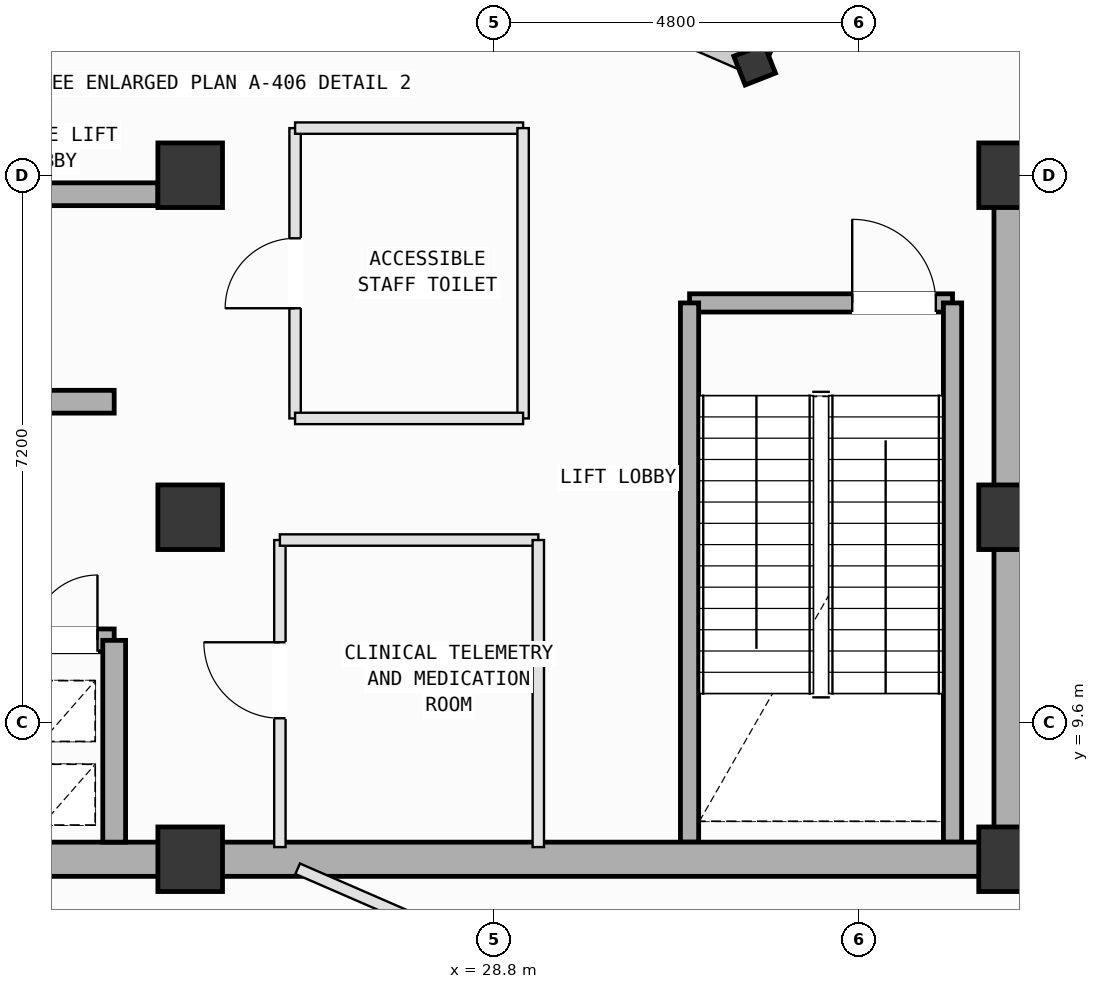
"""IFC4 building model, lengths in metres.
Left out: names, types, materials, properties, quantities, classifications, styles, units other than length and angle.
Written with IfcOpenShell. Run it as: python <this file> out.ifc"""

import sys

from ifc_helpers import new_model, si_unit, direction, frame, frame_2d, origin, origin_2d, place, context, subcontext, project, spatial, rectangle, i_section, extrude, element, fill, save


model = new_model("IFC4")
c1 = context("Model", 3, precision=1e-05, world=origin(), true_north=direction((0.0, 1.0)))
c2 = subcontext(c1, "Body", "Model", "MODEL_VIEW")
j1 = project(units=[si_unit("LENGTHUNIT", "METRE"), si_unit("PLANEANGLEUNIT", "RADIAN")], contexts=[c1])
p1 = place(None, origin())
s1 = spatial("IfcSite", under=j1, at=p1, CompositionType="ELEMENT")
p2 = place(p1, origin())
s2 = spatial("IfcBuilding", under=s1, at=p2, CompositionType="ELEMENT")
p3 = place(p2, frame((0.0, 0.0, 342.6)))
s3 = spatial("IfcBuildingStorey", under=s2, at=p3, CompositionType="ELEMENT", Elevation=342.6)
for number, where, z_axis, x_axis in (
    (1, (24.8, 7.8, 0.0), (0.0, 0.0, 1.0), (1.0, 0.0, 0.0)),
    (2, (24.8, 12.3, 0.0), (0.0, 0.0, 1.0), (1.0, 0.0, 0.0)),
    (3, (24.8, 16.8, 0.0), (0.0, 0.0, 1.0), (1.0, 0.0, 0.0)),
    (4, (35.6, 7.8, 0.0), (0.0, 0.0, 1.0), (1.0, 0.0, 0.0)),
    (5, (35.6, 12.3, 0.0), (0.0, 0.0, 1.0), (1.0, 0.0, 0.0)),
    (6, (35.6, 16.8, 0.0), (0.0, 0.0, 1.0), (1.0, 0.0, 0.0)),
):
    element("IfcColumn", number, at=place(p3, frame(where, z_axis=z_axis, x_axis=x_axis)), inside=s3, PredefinedType="COLUMN", context=c2, shape_type="SweptSolid", body=[
        extrude(rectangle(XDim=0.85, YDim=0.85, at=origin_2d()), origin(), (0.0, 0.0, 1.0), 5.2),
    ])
p4 = place(p3, frame((32.226, 18.255, 0.002), z_axis=(0.0, 0.0, 1.0), x_axis=(-0.366501226724, 0.930417567982, 0.0)))
e7 = element("IfcColumn", 7, at=p4, inside=s3, PredefinedType="COLUMN", context=c2, shape_type="SweptSolid", body=[
    extrude(i_section(OverallWidth=0.407, OverallDepth=0.428, WebThickness=0.02, FlangeThickness=0.035, FilletRadius=0.022, at=origin_2d()), origin(), (0.0, 0.0, 1.0), 5.196),
])
p5 = place(p3, frame((32.226, 18.255, 0.0), z_axis=(0.0, 0.0, 1.0), x_axis=(0.398742809918, 0.917062795853, 0.0)))
e8 = element("IfcWall", 8, at=p5, inside=s3, PredefinedType="SOLIDWALL", context=c2, shape_type="SweptSolid", body=[
    extrude(rectangle(XDim=6.95, YDim=0.28, at=frame_2d((3.475, 0.0))), origin(), (0.0, 0.0, 1.0), 4.335),
])
p6 = place(p5, frame((1.066, 0.0, 0.75)))
e9 = element("IfcOpeningElement", 9, at=p6, cuts=e8, PredefinedType="OPENING", context=c2, shape_type="SweptSolid", body=[
    extrude(rectangle(XDim=1.4, YDim=1.85, at=frame_2d((0.7, 0.925))), frame((0.0, 0.15, 0.0), z_axis=(0.0, -1.0, 0.0), x_axis=(1.0, 0.0, 0.0)), (0.0, 0.0, 1.0), 0.3),
])
p7 = place(p3, frame((25.119, 21.345, 0.0), z_axis=(0.0, 0.0, 1.0), x_axis=(0.917063044715, -0.398742237565, 0.0)))
e10 = element("IfcWall", 10, at=p7, inside=s3, PredefinedType="SOLIDWALL", context=c2, shape_type="SweptSolid", body=[
    extrude(rectangle(XDim=7.75, YDim=0.28, at=frame_2d((3.875, 0.0))), origin(), (0.0, 0.0, 1.0), 3.835),
])
p8 = place(p3, frame((31.37, 15.12, 0.0), z_axis=(0.0, 0.0, 1.0), x_axis=(1.0, 0.0, 0.0)))
e11 = element("IfcWall", 11, at=p8, inside=s3, PredefinedType="SOLIDWALL", context=c2, shape_type="SweptSolid", body=[
    extrude(rectangle(XDim=3.46, YDim=0.24, at=frame_2d((1.73, 0.0))), origin(), (0.0, 0.0, 1.0), 4.85),
])
p9 = place(p8, frame((2.14, 0.0, 0.0)))
e12 = element("IfcOpeningElement", 12, at=p9, cuts=e11, PredefinedType="OPENING", context=c2, shape_type="SweptSolid", body=[
    extrude(rectangle(XDim=1.1, YDim=2.15, at=frame_2d((0.55, 1.075))), frame((0.0, 0.13, 0.0), z_axis=(0.0, -1.0, 0.0), x_axis=(1.0, 0.0, 0.0)), (0.0, 0.0, 1.0), 0.26),
])
for number, where, z_axis, x_axis in (
    (13, (34.83, 15.12, 0.0), (0.0, 0.0, 1.0), (0.0, -1.0, 0.0)),
    (14, (31.37, 8.025, 0.0), (0.0, 0.0, 1.0), (0.0, 1.0, 0.0)),
):
    element("IfcWall", number, at=place(p3, frame(where, z_axis=z_axis, x_axis=x_axis)), inside=s3, PredefinedType="SOLIDWALL", context=c2, shape_type="SweptSolid", body=[
        extrude(rectangle(XDim=7.095, YDim=0.24, at=frame_2d((3.548, 0.0))), origin(), (0.0, 0.0, 1.0), 4.85),
    ])
for number, where, z_axis, x_axis in (
    (15, (14.0, 7.8, 0.0), (0.0, 0.0, 1.0), (1.0, 0.0, 0.0)),
    (16, (24.8, 7.8, 0.0), (0.0, 0.0, 1.0), (1.0, 0.0, 0.0)),
):
    element("IfcWall", number, at=place(p3, frame(where, z_axis=z_axis, x_axis=x_axis)), inside=s3, PredefinedType="SHEAR", context=c2, shape_type="SweptSolid", body=[
        extrude(rectangle(XDim=10.8, YDim=0.45, at=frame_2d((5.4, 0.0))), origin(), (0.0, 0.0, 1.0), 4.85),
    ])
p10 = place(p3, frame((35.6, 7.8, 0.0), z_axis=(0.0, 0.0, 1.0), x_axis=(0.0, 1.0, 0.0)))
e17 = element("IfcWall", 17, at=p10, inside=s3, PredefinedType="SHEAR", context=c2, shape_type="SweptSolid", body=[
    extrude(rectangle(XDim=9.0, YDim=0.45, at=frame_2d((4.5, 0.0))), origin(), (0.0, 0.0, 1.0), 4.85),
])
p11 = place(p3, frame((19.85, 16.55, 0.0), z_axis=(0.0, 0.0, 1.0), x_axis=(1.0, 0.0, 0.0)))
e18 = element("IfcWall", 18, at=p11, inside=s3, PredefinedType="SOLIDWALL", context=c2, shape_type="SweptSolid", body=[
    extrude(rectangle(XDim=4.525, YDim=0.3, at=frame_2d((2.262, 0.0))), origin(), (0.0, 0.0, 1.0), 4.85),
])
p12 = place(p11, frame((0.475, 0.0, 0.0)))
e19 = element("IfcOpeningElement", 19, at=p12, cuts=e18, PredefinedType="OPENING", context=c2, shape_type="SweptSolid", body=[
    extrude(rectangle(XDim=1.25, YDim=2.18, at=frame_2d((0.625, 1.09))), frame((0.0, 0.16, 0.0), z_axis=(0.0, -1.0, 0.0), x_axis=(1.0, 0.0, 0.0)), (0.0, 0.0, 1.0), 0.32),
])
p13 = place(p3, frame((18.5, 10.68, 0.0), z_axis=(0.0, 0.0, 1.0), x_axis=(1.0, 0.0, 0.0)))
e20 = element("IfcWall", 20, at=p13, inside=s3, PredefinedType="SOLIDWALL", context=c2, shape_type="SweptSolid", body=[
    extrude(rectangle(XDim=5.3, YDim=0.3, at=frame_2d((2.65, 0.0))), origin(), (0.0, 0.0, 1.0), 4.85),
])
p14 = place(p13, frame((4.22, 0.0, 0.0)))
e21 = element("IfcOpeningElement", 21, at=p14, cuts=e20, PredefinedType="OPENING", context=c2, shape_type="SweptSolid", body=[
    extrude(rectangle(XDim=0.86, YDim=2.06, at=frame_2d((0.43, 1.03))), frame((0.0, 0.16, 0.0), z_axis=(0.0, -1.0, 0.0), x_axis=(1.0, 0.0, 0.0)), (0.0, 0.0, 1.0), 0.32),
])
p15 = place(p13, frame((0.425, 0.0, 0.0)))
e22 = element("IfcOpeningElement", 22, at=p15, cuts=e20, PredefinedType="OPENING", context=c2, shape_type="SweptSolid", body=[
    extrude(rectangle(XDim=1.25, YDim=2.18, at=frame_2d((0.625, 1.09))), frame((0.0, 0.16, 0.0), z_axis=(0.0, -1.0, 0.0), x_axis=(1.0, 0.0, 0.0)), (0.0, 0.0, 1.0), 0.32),
])
p16 = place(p13, frame((2.525, 0.0, 0.0)))
e23 = element("IfcOpeningElement", 23, at=p16, cuts=e20, PredefinedType="OPENING", context=c2, shape_type="SweptSolid", body=[
    extrude(rectangle(XDim=1.25, YDim=2.18, at=frame_2d((0.625, 1.09))), frame((0.0, 0.16, 0.0), z_axis=(0.0, -1.0, 0.0), x_axis=(1.0, 0.0, 0.0)), (0.0, 0.0, 1.0), 0.32),
])
p17 = place(p3, frame((18.5, 13.82, 0.0), z_axis=(0.0, 0.0, 1.0), x_axis=(1.0, 0.0, 0.0)))
e24 = element("IfcWall", 24, at=p17, inside=s3, PredefinedType="SOLIDWALL", context=c2, shape_type="SweptSolid", body=[
    extrude(rectangle(XDim=5.3, YDim=0.3, at=frame_2d((2.65, 0.0))), origin(), (0.0, 0.0, 1.0), 4.85),
])
p18 = place(p17, frame((0.18, 0.0, 0.0)))
e25 = element("IfcOpeningElement", 25, at=p18, cuts=e24, PredefinedType="OPENING", context=c2, shape_type="SweptSolid", body=[
    extrude(rectangle(XDim=1.1, YDim=2.15, at=frame_2d((0.55, 1.075))), frame((0.0, 0.16, 0.0), z_axis=(0.0, -1.0, 0.0), x_axis=(1.0, 0.0, 0.0)), (0.0, 0.0, 1.0), 0.32),
])
p19 = place(p3, frame((23.8, 8.025, 0.0), z_axis=(0.0, 0.0, 1.0), x_axis=(0.0, 1.0, 0.0)))
e26 = element("IfcWall", 26, at=p19, inside=s3, PredefinedType="SOLIDWALL", context=c2, shape_type="SweptSolid", body=[
    extrude(rectangle(XDim=2.655, YDim=0.3, at=frame_2d((1.328, 0.0))), origin(), (0.0, 0.0, 1.0), 4.85),
])
p20 = place(p3, frame((25.98, 7.96, 0.0), z_axis=(0.0, 0.0, 1.0), x_axis=(0.0, 1.0, 0.0)))
e27 = element("IfcWall", 27, at=p20, inside=s3, PredefinedType="PARTITIONING", context=c2, shape_type="SweptSolid", body=[
    extrude(rectangle(XDim=4.04, YDim=0.15, at=frame_2d((2.02, 0.0))), origin(), (0.0, 0.0, 1.0), 4.85),
])
p21 = place(p20, frame((1.695, 0.0, 0.0)))
e28 = element("IfcOpeningElement", 28, at=p21, cuts=e27, PredefinedType="OPENING", context=c2, shape_type="SweptSolid", body=[
    extrude(rectangle(XDim=1.0, YDim=2.12, at=frame_2d((0.5, 1.06))), frame((0.0, 0.085, 0.0), z_axis=(0.0, -1.0, 0.0), x_axis=(1.0, 0.0, 0.0)), (0.0, 0.0, 1.0), 0.17),
])
p22 = place(p3, frame((25.98, 12.0, 0.0), z_axis=(0.0, 0.0, 1.0), x_axis=(1.0, 0.0, 0.0)))
e29 = element("IfcWall", 29, at=p22, inside=s3, PredefinedType="PARTITIONING", context=c2, shape_type="SweptSolid", body=[
    extrude(rectangle(XDim=3.4, YDim=0.15, at=frame_2d((1.7, 0.0))), origin(), (0.0, 0.0, 1.0), 4.85),
])
p23 = place(p3, frame((29.38, 12.0, 0.0), z_axis=(0.0, 0.0, 1.0), x_axis=(0.0, -1.0, 0.0)))
e30 = element("IfcWall", 30, at=p23, inside=s3, PredefinedType="PARTITIONING", context=c2, shape_type="SweptSolid", body=[
    extrude(rectangle(XDim=4.04, YDim=0.15, at=frame_2d((2.02, 0.0))), origin(), (0.0, 0.0, 1.0), 4.85),
])
p24 = place(p3, frame((26.18, 13.6, 0.0), z_axis=(0.0, 0.0, 1.0), x_axis=(0.0, 1.0, 0.0)))
e31 = element("IfcWall", 31, at=p24, inside=s3, PredefinedType="PARTITIONING", context=c2, shape_type="SweptSolid", body=[
    extrude(rectangle(XDim=3.82, YDim=0.15, at=frame_2d((1.91, 0.0))), origin(), (0.0, 0.0, 1.0), 4.85),
])
p25 = place(p24, frame((1.45, 0.0, 0.0)))
e32 = element("IfcOpeningElement", 32, at=p25, cuts=e31, PredefinedType="OPENING", context=c2, shape_type="SweptSolid", body=[
    extrude(rectangle(XDim=0.92, YDim=2.1, at=frame_2d((0.46, 1.05))), frame((0.0, 0.085, 0.0), z_axis=(0.0, -1.0, 0.0), x_axis=(1.0, 0.0, 0.0)), (0.0, 0.0, 1.0), 0.17),
])
p26 = place(p3, frame((26.18, 17.42, 0.0), z_axis=(0.0, 0.0, 1.0), x_axis=(1.0, 0.0, 0.0)))
e33 = element("IfcWall", 33, at=p26, inside=s3, PredefinedType="PARTITIONING", context=c2, shape_type="SweptSolid", body=[
    extrude(rectangle(XDim=3.0, YDim=0.15, at=frame_2d((1.5, 0.0))), origin(), (0.0, 0.0, 1.0), 4.85),
])
p27 = place(p3, frame((29.18, 17.42, 0.0), z_axis=(0.0, 0.0, 1.0), x_axis=(0.0, -1.0, 0.0)))
e34 = element("IfcWall", 34, at=p27, inside=s3, PredefinedType="PARTITIONING", context=c2, shape_type="SweptSolid", body=[
    extrude(rectangle(XDim=3.82, YDim=0.15, at=frame_2d((1.91, 0.0))), origin(), (0.0, 0.0, 1.0), 4.85),
])
p28 = place(p3, frame((29.18, 13.6, 0.0), z_axis=(0.0, 0.0, 1.0), x_axis=(-1.0, 0.0, 0.0)))
e35 = element("IfcWall", 35, at=p28, inside=s3, PredefinedType="PARTITIONING", context=c2, shape_type="SweptSolid", body=[
    extrude(rectangle(XDim=3.0, YDim=0.15, at=frame_2d((1.5, 0.0))), origin(), (0.0, 0.0, 1.0), 4.85),
])
p29 = place(p3, frame((35.396, -4.55, 0.0), z_axis=(0.0, 0.0, 1.0), x_axis=(0.398695317753, 0.917083444187, 0.0)))
e36 = element("IfcWall", 36, at=p29, inside=s3, PredefinedType="PARTITIONING", context=c2, shape_type="SweptSolid", body=[
    extrude(rectangle(XDim=13.336, YDim=0.18, at=frame_2d((6.668, 0.0))), origin(), (0.0, 0.0, 1.0), 3.835),
])
p30 = place(p29, frame((5.793, 0.0, 0.0)))
e37 = element("IfcOpeningElement", 37, at=p30, cuts=e36, PredefinedType="OPENING", context=c2, shape_type="SweptSolid", body=[
    extrude(rectangle(XDim=1.75, YDim=2.2, at=frame_2d((0.875, 1.1))), frame((0.0, 0.1, 0.0), z_axis=(0.0, -1.0, 0.0), x_axis=(1.0, 0.0, 0.0)), (0.0, 0.0, 1.0), 0.2),
])
p31 = place(p3, frame((26.214, 7.675, 0.0), z_axis=(0.0, 0.0, 1.0), x_axis=(0.91704872202, -0.398775176561, 0.0)))
e38 = element("IfcWall", 38, at=p31, inside=s3, PredefinedType="PARTITIONING", context=c2, shape_type="SweptSolid", body=[
    extrude(rectangle(XDim=9.825, YDim=0.15, at=frame_2d((4.913, 0.0))), origin(), (0.0, 0.0, 1.0), 4.85),
])
p32 = place(p31, frame((7.752, 0.0, 0.0)))
e39 = element("IfcOpeningElement", 39, at=p32, cuts=e38, PredefinedType="OPENING", context=c2, shape_type="SweptSolid", body=[
    extrude(rectangle(XDim=0.92, YDim=2.1, at=frame_2d((0.46, 1.05))), frame((0.0, 0.085, 0.0), z_axis=(0.0, -1.0, 0.0), x_axis=(1.0, 0.0, 0.0)), (0.0, 0.0, 1.0), 0.17),
])
p33 = place(p9, origin())
e40 = element("IfcDoor", 40, at=p33, inside=s3, OperationType="SINGLE_SWING_LEFT", PredefinedType="DOOR", context=c2, shape_type="SweptSolid", body=[
    extrude(rectangle(XDim=1.1, YDim=2.15, at=frame_2d((0.55, 1.075))), frame((0.0, 0.025, 0.0), z_axis=(0.0, -1.0, 0.0), x_axis=(1.0, 0.0, 0.0)), (0.0, 0.0, 1.0), 0.05),
])
fill(e12, e40)
p34 = place(p14, origin())
e41 = element("IfcDoor", 41, at=p34, inside=s3, OperationType="SINGLE_SWING_RIGHT", PredefinedType="DOOR", context=c2, shape_type="SweptSolid", body=[
    extrude(rectangle(XDim=0.86, YDim=2.06, at=frame_2d((0.43, 1.03))), frame((0.0, 0.025, 0.0), z_axis=(0.0, -1.0, 0.0), x_axis=(1.0, 0.0, 0.0)), (0.0, 0.0, 1.0), 0.05),
])
fill(e21, e41)
p35 = place(p21, origin())
e42 = element("IfcDoor", 42, at=p35, inside=s3, OperationType="SINGLE_SWING_RIGHT", PredefinedType="DOOR", context=c2, shape_type="SweptSolid", body=[
    extrude(rectangle(XDim=1.0, YDim=2.12, at=frame_2d((0.5, 1.06))), frame((0.0, 0.025, 0.0), z_axis=(0.0, -1.0, 0.0), x_axis=(1.0, 0.0, 0.0)), (0.0, 0.0, 1.0), 0.05),
])
fill(e28, e42)
p36 = place(p25, origin())
e43 = element("IfcDoor", 43, at=p36, inside=s3, OperationType="SINGLE_SWING_LEFT", PredefinedType="DOOR", context=c2, shape_type="SweptSolid", body=[
    extrude(rectangle(XDim=0.92, YDim=2.1, at=frame_2d((0.46, 1.05))), frame((0.0, 0.025, 0.0), z_axis=(0.0, -1.0, 0.0), x_axis=(1.0, 0.0, 0.0)), (0.0, 0.0, 1.0), 0.05),
])
fill(e32, e43)
save(model, sys.argv[1])
